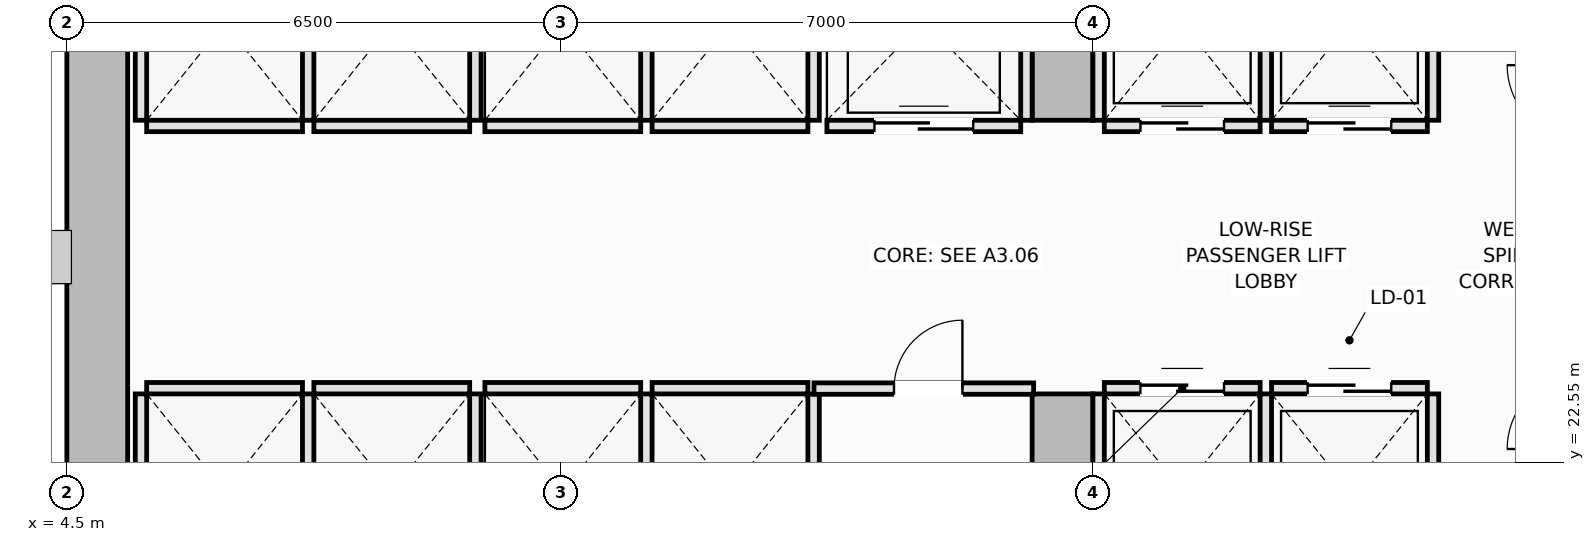
"""IFC4 building model, lengths in metres.
Left out: names, types, materials, properties, quantities, classifications, styles, units other than length and angle.
Written with IfcOpenShell. Run it as: python <this file> out.ifc"""

import sys

from ifc_helpers import new_model, si_unit, direction, frame, frame_2d, origin, place, context, subcontext, project, spatial, rectangle, extrude, element, fill, save


model = new_model("IFC4")
c1 = context("Model", 3, precision=1e-05, world=origin(), true_north=direction((0.0, 1.0)))
c2 = subcontext(c1, "Body", "Model", "MODEL_VIEW")
j1 = project(units=[si_unit("LENGTHUNIT", "METRE"), si_unit("PLANEANGLEUNIT", "RADIAN")], contexts=[c1])
p1 = place(None, origin())
s1 = spatial("IfcSite", under=j1, at=p1, CompositionType="ELEMENT")
p2 = place(p1, origin())
s2 = spatial("IfcBuilding", under=s1, at=p2, CompositionType="ELEMENT")
p3 = place(p2, frame((0.0, 0.0, 85.95)))
s3 = spatial("IfcBuildingStorey", under=s2, at=p3, CompositionType="ELEMENT", Elevation=85.95)
p4 = place(p3, frame((4.9, 14.8, 0.0), z_axis=(0.0, 0.0, 1.0), x_axis=(0.0, 1.0, 0.0)))
e1 = element("IfcWall", 1, at=p4, inside=s3, PredefinedType="SHEAR", context=c2, shape_type="SweptSolid", body=[
    extrude(rectangle(XDim=20.9, YDim=0.8, at=frame_2d((10.45, 0.0))), origin(), (0.0, 0.0, 1.0), 3.55),
])
p5 = place(p3, frame((17.6, 14.8, 0.0), z_axis=(0.0, 0.0, 1.0), x_axis=(0.0, 1.0, 0.0)))
e2 = element("IfcWall", 2, at=p5, inside=s3, PredefinedType="SHEAR", context=c2, shape_type="SweptSolid", body=[
    extrude(rectangle(XDim=8.65, YDim=0.8, at=frame_2d((4.325, 0.0))), origin(), (0.0, 0.0, 1.0), 3.55),
])
p6 = place(p5, frame((4.1, 0.0, 0.0)))
e3 = element("IfcOpeningElement", 3, at=p6, cuts=e2, PredefinedType="OPENING", context=c2, shape_type="SweptSolid", body=[
    extrude(rectangle(XDim=1.1, YDim=2.15, at=frame_2d((0.55, 1.075))), frame((0.0, 0.41, 0.0), z_axis=(0.0, -1.0, 0.0), x_axis=(1.0, 0.0, 0.0)), (0.0, 0.0, 1.0), 0.82),
])
p7 = place(p3, frame((17.6, 27.05, 0.0), z_axis=(0.0, 0.0, 1.0), x_axis=(0.0, 1.0, 0.0)))
e4 = element("IfcWall", 4, at=p7, inside=s3, PredefinedType="SHEAR", context=c2, shape_type="SweptSolid", body=[
    extrude(rectangle(XDim=8.65, YDim=0.8, at=frame_2d((4.325, 0.0))), origin(), (0.0, 0.0, 1.0), 3.55),
])
p8 = place(p7, frame((3.45, 0.0, 0.0)))
e5 = element("IfcOpeningElement", 5, at=p8, cuts=e4, PredefinedType="OPENING", context=c2, shape_type="SweptSolid", body=[
    extrude(rectangle(XDim=1.1, YDim=2.15, at=frame_2d((0.55, 1.075))), frame((0.0, 0.41, 0.0), z_axis=(0.0, -1.0, 0.0), x_axis=(1.0, 0.0, 0.0)), (0.0, 0.0, 1.0), 0.82),
])
p9 = place(p3, frame((18.15, 23.525, 0.0), z_axis=(0.0, 0.0, 1.0), x_axis=(1.0, 0.0, 0.0)))
e6 = element("IfcWall", 6, at=p9, inside=s3, PredefinedType="PARTITIONING", context=c2, shape_type="SweptSolid", body=[
    extrude(rectangle(XDim=2.05, YDim=0.15, at=frame_2d((1.025, 0.0))), origin(), (0.0, 0.0, 1.0), 3.37),
])
p10 = place(p9, frame((0.475, 0.0, 0.0)))
e7 = element("IfcOpeningElement", 7, at=p10, cuts=e6, PredefinedType="OPENING", context=c2, shape_type="SweptSolid", body=[
    extrude(rectangle(XDim=1.1, YDim=2.2, at=frame_2d((0.55, 1.1))), frame((0.0, 0.085, 0.0), z_axis=(0.0, -1.0, 0.0), x_axis=(1.0, 0.0, 0.0)), (0.0, 0.0, 1.0), 0.17),
])
for number, where, z_axis, x_axis in (
    (8, (18.075, 20.9, 0.0), (0.0, 0.0, 1.0), (0.0, 1.0, 0.0)),
    (9, (20.275, 20.9, 0.0), (0.0, 0.0, 1.0), (0.0, 1.0, 0.0)),
):
    element("IfcWall", number, at=place(p3, frame(where, z_axis=z_axis, x_axis=x_axis)), inside=s3, PredefinedType="PARTITIONING", context=c2, shape_type="SweptSolid", body=[
        extrude(rectangle(XDim=2.55, YDim=0.15, at=frame_2d((1.275, 0.0))), origin(), (0.0, 0.0, 1.0), 3.37),
    ])
p11 = place(p3, frame((20.35, 23.525, 0.0), z_axis=(0.0, 0.0, 1.0), x_axis=(1.0, 0.0, 0.0)))
e10 = element("IfcWall", 10, at=p11, inside=s3, PredefinedType="PARTITIONING", context=c2, shape_type="SweptSolid", body=[
    extrude(rectangle(XDim=2.05, YDim=0.15, at=frame_2d((1.025, 0.0))), origin(), (0.0, 0.0, 1.0), 3.37),
])
p12 = place(p11, frame((0.475, 0.0, 0.0)))
e11 = element("IfcOpeningElement", 11, at=p12, cuts=e10, PredefinedType="OPENING", context=c2, shape_type="SweptSolid", body=[
    extrude(rectangle(XDim=1.1, YDim=2.2, at=frame_2d((0.55, 1.1))), frame((0.0, 0.085, 0.0), z_axis=(0.0, -1.0, 0.0), x_axis=(1.0, 0.0, 0.0)), (0.0, 0.0, 1.0), 0.17),
])
p13 = place(p3, frame((22.475, 20.9, 0.0), z_axis=(0.0, 0.0, 1.0), x_axis=(0.0, 1.0, 0.0)))
e12 = element("IfcWall", 12, at=p13, inside=s3, PredefinedType="PARTITIONING", context=c2, shape_type="SweptSolid", body=[
    extrude(rectangle(XDim=2.55, YDim=0.15, at=frame_2d((1.275, 0.0))), origin(), (0.0, 0.0, 1.0), 3.37),
])
p14 = place(p3, frame((18.15, 26.975, 0.0), z_axis=(0.0, 0.0, 1.0), x_axis=(1.0, 0.0, 0.0)))
e13 = element("IfcWall", 13, at=p14, inside=s3, PredefinedType="PARTITIONING", context=c2, shape_type="SweptSolid", body=[
    extrude(rectangle(XDim=2.05, YDim=0.15, at=frame_2d((1.025, 0.0))), origin(), (0.0, 0.0, 1.0), 3.37),
])
p15 = place(p14, frame((0.475, 0.0, 0.0)))
e14 = element("IfcOpeningElement", 14, at=p15, cuts=e13, PredefinedType="OPENING", context=c2, shape_type="SweptSolid", body=[
    extrude(rectangle(XDim=1.1, YDim=2.2, at=frame_2d((0.55, 1.1))), frame((0.0, 0.085, 0.0), z_axis=(0.0, -1.0, 0.0), x_axis=(1.0, 0.0, 0.0)), (0.0, 0.0, 1.0), 0.17),
])
for number, where, z_axis, x_axis in (
    (15, (18.075, 27.05, 0.0), (0.0, 0.0, 1.0), (0.0, 1.0, 0.0)),
    (16, (20.275, 27.05, 0.0), (0.0, 0.0, 1.0), (0.0, 1.0, 0.0)),
):
    element("IfcWall", number, at=place(p3, frame(where, z_axis=z_axis, x_axis=x_axis)), inside=s3, PredefinedType="PARTITIONING", context=c2, shape_type="SweptSolid", body=[
        extrude(rectangle(XDim=2.55, YDim=0.15, at=frame_2d((1.275, 0.0))), origin(), (0.0, 0.0, 1.0), 3.37),
    ])
p16 = place(p3, frame((20.35, 26.975, 0.0), z_axis=(0.0, 0.0, 1.0), x_axis=(1.0, 0.0, 0.0)))
e17 = element("IfcWall", 17, at=p16, inside=s3, PredefinedType="PARTITIONING", context=c2, shape_type="SweptSolid", body=[
    extrude(rectangle(XDim=2.05, YDim=0.15, at=frame_2d((1.025, 0.0))), origin(), (0.0, 0.0, 1.0), 3.37),
])
p17 = place(p16, frame((0.475, 0.0, 0.0)))
e18 = element("IfcOpeningElement", 18, at=p17, cuts=e17, PredefinedType="OPENING", context=c2, shape_type="SweptSolid", body=[
    extrude(rectangle(XDim=1.1, YDim=2.2, at=frame_2d((0.55, 1.1))), frame((0.0, 0.085, 0.0), z_axis=(0.0, -1.0, 0.0), x_axis=(1.0, 0.0, 0.0)), (0.0, 0.0, 1.0), 0.17),
])
p18 = place(p3, frame((22.475, 27.05, 0.0), z_axis=(0.0, 0.0, 1.0), x_axis=(0.0, 1.0, 0.0)))
e19 = element("IfcWall", 19, at=p18, inside=s3, PredefinedType="PARTITIONING", context=c2, shape_type="SweptSolid", body=[
    extrude(rectangle(XDim=2.55, YDim=0.15, at=frame_2d((1.275, 0.0))), origin(), (0.0, 0.0, 1.0), 3.37),
])
p19 = place(p3, frame((5.55, 23.525, 0.0), z_axis=(0.0, 0.0, 1.0), x_axis=(1.0, 0.0, 0.0)))
e20 = element("IfcWall", 20, at=p19, inside=s3, PredefinedType="PARTITIONING", context=c2, shape_type="SweptSolid", body=[
    extrude(rectangle(XDim=2.05, YDim=0.15, at=frame_2d((1.025, 0.0))), origin(), (0.0, 0.0, 1.0), 3.37),
])
for number, where, z_axis, x_axis in (
    (21, (5.475, 20.9, 0.0), (0.0, 0.0, 1.0), (0.0, 1.0, 0.0)),
    (22, (7.675, 20.9, 0.0), (0.0, 0.0, 1.0), (0.0, 1.0, 0.0)),
):
    element("IfcWall", number, at=place(p3, frame(where, z_axis=z_axis, x_axis=x_axis)), inside=s3, PredefinedType="PARTITIONING", context=c2, shape_type="SweptSolid", body=[
        extrude(rectangle(XDim=2.55, YDim=0.15, at=frame_2d((1.275, 0.0))), origin(), (0.0, 0.0, 1.0), 3.37),
    ])
p20 = place(p3, frame((7.75, 23.525, 0.0), z_axis=(0.0, 0.0, 1.0), x_axis=(1.0, 0.0, 0.0)))
e23 = element("IfcWall", 23, at=p20, inside=s3, PredefinedType="PARTITIONING", context=c2, shape_type="SweptSolid", body=[
    extrude(rectangle(XDim=2.05, YDim=0.15, at=frame_2d((1.025, 0.0))), origin(), (0.0, 0.0, 1.0), 3.37),
])
p21 = place(p3, frame((9.875, 20.9, 0.0), z_axis=(0.0, 0.0, 1.0), x_axis=(0.0, 1.0, 0.0)))
e24 = element("IfcWall", 24, at=p21, inside=s3, PredefinedType="PARTITIONING", context=c2, shape_type="SweptSolid", body=[
    extrude(rectangle(XDim=2.55, YDim=0.15, at=frame_2d((1.275, 0.0))), origin(), (0.0, 0.0, 1.0), 3.37),
])
p22 = place(p3, frame((5.55, 26.975, 0.0), z_axis=(0.0, 0.0, 1.0), x_axis=(1.0, 0.0, 0.0)))
e25 = element("IfcWall", 25, at=p22, inside=s3, PredefinedType="PARTITIONING", context=c2, shape_type="SweptSolid", body=[
    extrude(rectangle(XDim=2.05, YDim=0.15, at=frame_2d((1.025, 0.0))), origin(), (0.0, 0.0, 1.0), 3.37),
])
for number, where, z_axis, x_axis in (
    (26, (5.475, 27.05, 0.0), (0.0, 0.0, 1.0), (0.0, 1.0, 0.0)),
    (27, (7.675, 27.05, 0.0), (0.0, 0.0, 1.0), (0.0, 1.0, 0.0)),
):
    element("IfcWall", number, at=place(p3, frame(where, z_axis=z_axis, x_axis=x_axis)), inside=s3, PredefinedType="PARTITIONING", context=c2, shape_type="SweptSolid", body=[
        extrude(rectangle(XDim=2.55, YDim=0.15, at=frame_2d((1.275, 0.0))), origin(), (0.0, 0.0, 1.0), 3.37),
    ])
p23 = place(p3, frame((7.75, 26.975, 0.0), z_axis=(0.0, 0.0, 1.0), x_axis=(1.0, 0.0, 0.0)))
e28 = element("IfcWall", 28, at=p23, inside=s3, PredefinedType="PARTITIONING", context=c2, shape_type="SweptSolid", body=[
    extrude(rectangle(XDim=2.05, YDim=0.15, at=frame_2d((1.025, 0.0))), origin(), (0.0, 0.0, 1.0), 3.37),
])
p24 = place(p3, frame((9.875, 27.05, 0.0), z_axis=(0.0, 0.0, 1.0), x_axis=(0.0, 1.0, 0.0)))
e29 = element("IfcWall", 29, at=p24, inside=s3, PredefinedType="PARTITIONING", context=c2, shape_type="SweptSolid", body=[
    extrude(rectangle(XDim=2.55, YDim=0.15, at=frame_2d((1.275, 0.0))), origin(), (0.0, 0.0, 1.0), 3.37),
])
p25 = place(p3, frame((10.0, 23.525, 0.0), z_axis=(0.0, 0.0, 1.0), x_axis=(1.0, 0.0, 0.0)))
e30 = element("IfcWall", 30, at=p25, inside=s3, PredefinedType="PARTITIONING", context=c2, shape_type="SweptSolid", body=[
    extrude(rectangle(XDim=2.05, YDim=0.15, at=frame_2d((1.025, 0.0))), origin(), (0.0, 0.0, 1.0), 3.37),
])
p26 = place(p3, frame((12.125, 20.9, 0.0), z_axis=(0.0, 0.0, 1.0), x_axis=(0.0, 1.0, 0.0)))
e31 = element("IfcWall", 31, at=p26, inside=s3, PredefinedType="PARTITIONING", context=c2, shape_type="SweptSolid", body=[
    extrude(rectangle(XDim=2.55, YDim=0.15, at=frame_2d((1.275, 0.0))), origin(), (0.0, 0.0, 1.0), 3.37),
])
p27 = place(p3, frame((12.2, 23.525, 0.0), z_axis=(0.0, 0.0, 1.0), x_axis=(1.0, 0.0, 0.0)))
e32 = element("IfcWall", 32, at=p27, inside=s3, PredefinedType="PARTITIONING", context=c2, shape_type="SweptSolid", body=[
    extrude(rectangle(XDim=2.05, YDim=0.15, at=frame_2d((1.025, 0.0))), origin(), (0.0, 0.0, 1.0), 3.37),
])
p28 = place(p3, frame((14.325, 20.9, 0.0), z_axis=(0.0, 0.0, 1.0), x_axis=(0.0, 1.0, 0.0)))
e33 = element("IfcWall", 33, at=p28, inside=s3, PredefinedType="PARTITIONING", context=c2, shape_type="SweptSolid", body=[
    extrude(rectangle(XDim=2.55, YDim=0.15, at=frame_2d((1.275, 0.0))), origin(), (0.0, 0.0, 1.0), 3.37),
])
p29 = place(p3, frame((10.0, 26.975, 0.0), z_axis=(0.0, 0.0, 1.0), x_axis=(1.0, 0.0, 0.0)))
e34 = element("IfcWall", 34, at=p29, inside=s3, PredefinedType="PARTITIONING", context=c2, shape_type="SweptSolid", body=[
    extrude(rectangle(XDim=2.05, YDim=0.15, at=frame_2d((1.025, 0.0))), origin(), (0.0, 0.0, 1.0), 3.37),
])
p30 = place(p3, frame((12.125, 27.05, 0.0), z_axis=(0.0, 0.0, 1.0), x_axis=(0.0, 1.0, 0.0)))
e35 = element("IfcWall", 35, at=p30, inside=s3, PredefinedType="PARTITIONING", context=c2, shape_type="SweptSolid", body=[
    extrude(rectangle(XDim=2.55, YDim=0.15, at=frame_2d((1.275, 0.0))), origin(), (0.0, 0.0, 1.0), 3.37),
])
p31 = place(p3, frame((12.2, 26.975, 0.0), z_axis=(0.0, 0.0, 1.0), x_axis=(1.0, 0.0, 0.0)))
e36 = element("IfcWall", 36, at=p31, inside=s3, PredefinedType="PARTITIONING", context=c2, shape_type="SweptSolid", body=[
    extrude(rectangle(XDim=2.05, YDim=0.15, at=frame_2d((1.025, 0.0))), origin(), (0.0, 0.0, 1.0), 3.37),
])
p32 = place(p3, frame((14.325, 27.05, 0.0), z_axis=(0.0, 0.0, 1.0), x_axis=(0.0, 1.0, 0.0)))
e37 = element("IfcWall", 37, at=p32, inside=s3, PredefinedType="PARTITIONING", context=c2, shape_type="SweptSolid", body=[
    extrude(rectangle(XDim=2.55, YDim=0.15, at=frame_2d((1.275, 0.0))), origin(), (0.0, 0.0, 1.0), 3.37),
])
p33 = place(p3, frame((14.5, 26.975, 0.0), z_axis=(0.0, 0.0, 1.0), x_axis=(1.0, 0.0, 0.0)))
e38 = element("IfcWall", 38, at=p33, inside=s3, PredefinedType="PARTITIONING", context=c2, shape_type="SweptSolid", body=[
    extrude(rectangle(XDim=2.55, YDim=0.15, at=frame_2d((1.275, 0.0))), origin(), (0.0, 0.0, 1.0), 3.37),
])
p34 = place(p33, frame((0.625, 0.0, 0.0)))
e39 = element("IfcOpeningElement", 39, at=p34, cuts=e38, PredefinedType="OPENING", context=c2, shape_type="SweptSolid", body=[
    extrude(rectangle(XDim=1.3, YDim=2.2, at=frame_2d((0.65, 1.1))), frame((0.0, 0.085, 0.0), z_axis=(0.0, -1.0, 0.0), x_axis=(1.0, 0.0, 0.0)), (0.0, 0.0, 1.0), 0.17),
])
p35 = place(p3, frame((17.125, 27.05, 0.0), z_axis=(0.0, 0.0, 1.0), x_axis=(0.0, 1.0, 0.0)))
e40 = element("IfcWall", 40, at=p35, inside=s3, PredefinedType="PARTITIONING", context=c2, shape_type="SweptSolid", body=[
    extrude(rectangle(XDim=2.6, YDim=0.15, at=frame_2d((1.3, 0.0))), origin(), (0.0, 0.0, 1.0), 3.37),
])
p36 = place(p3, frame((14.33, 23.52, 0.0), z_axis=(0.0, 0.0, 1.0), x_axis=(1.0, 0.0, 0.0)))
e41 = element("IfcWall", 41, at=p36, inside=s3, PredefinedType="PARTITIONING", context=c2, shape_type="SweptSolid", body=[
    extrude(rectangle(XDim=2.89, YDim=0.15, at=frame_2d((1.445, 0.0))), origin(), (0.0, 0.0, 1.0), 3.37),
])
p37 = place(p36, frame((1.053, 0.0, 0.0)))
e42 = element("IfcOpeningElement", 42, at=p37, cuts=e41, PredefinedType="OPENING", context=c2, shape_type="SweptSolid", body=[
    extrude(rectangle(XDim=0.9, YDim=2.1, at=frame_2d((0.45, 1.05))), frame((0.0, 0.085, 0.0), z_axis=(0.0, -1.0, 0.0), x_axis=(1.0, 0.0, 0.0)), (0.0, 0.0, 1.0), 0.17),
])
p38 = place(p10, origin())
e43 = element("IfcDoor", 43, at=p38, inside=s3, OperationType="DOUBLE_DOOR_SLIDING", PredefinedType="DOOR", context=c2, shape_type="SweptSolid", body=[
    extrude(rectangle(XDim=1.1, YDim=2.2, at=frame_2d((0.55, 1.1))), frame((0.0, 0.025, 0.0), z_axis=(0.0, -1.0, 0.0), x_axis=(1.0, 0.0, 0.0)), (0.0, 0.0, 1.0), 0.05),
])
fill(e7, e43)
p39 = place(p12, origin())
e44 = element("IfcDoor", 44, at=p39, inside=s3, OperationType="DOUBLE_DOOR_SLIDING", PredefinedType="DOOR", context=c2, shape_type="SweptSolid", body=[
    extrude(rectangle(XDim=1.1, YDim=2.2, at=frame_2d((0.55, 1.1))), frame((0.0, 0.025, 0.0), z_axis=(0.0, -1.0, 0.0), x_axis=(1.0, 0.0, 0.0)), (0.0, 0.0, 1.0), 0.05),
])
fill(e11, e44)
p40 = place(p15, origin())
e45 = element("IfcDoor", 45, at=p40, inside=s3, OperationType="DOUBLE_DOOR_SLIDING", PredefinedType="DOOR", context=c2, shape_type="SweptSolid", body=[
    extrude(rectangle(XDim=1.1, YDim=2.2, at=frame_2d((0.55, 1.1))), frame((0.0, 0.025, 0.0), z_axis=(0.0, -1.0, 0.0), x_axis=(1.0, 0.0, 0.0)), (0.0, 0.0, 1.0), 0.05),
])
fill(e14, e45)
p41 = place(p17, origin())
e46 = element("IfcDoor", 46, at=p41, inside=s3, OperationType="DOUBLE_DOOR_SLIDING", PredefinedType="DOOR", context=c2, shape_type="SweptSolid", body=[
    extrude(rectangle(XDim=1.1, YDim=2.2, at=frame_2d((0.55, 1.1))), frame((0.0, 0.025, 0.0), z_axis=(0.0, -1.0, 0.0), x_axis=(1.0, 0.0, 0.0)), (0.0, 0.0, 1.0), 0.05),
])
fill(e18, e46)
p42 = place(p34, origin())
e47 = element("IfcDoor", 47, at=p42, inside=s3, OperationType="DOUBLE_DOOR_SLIDING", PredefinedType="DOOR", context=c2, shape_type="SweptSolid", body=[
    extrude(rectangle(XDim=1.3, YDim=2.2, at=frame_2d((0.65, 1.1))), frame((0.0, 0.025, 0.0), z_axis=(0.0, -1.0, 0.0), x_axis=(1.0, 0.0, 0.0)), (0.0, 0.0, 1.0), 0.05),
])
fill(e39, e47)
p43 = place(p37, origin())
e48 = element("IfcDoor", 48, at=p43, inside=s3, OperationType="SINGLE_SWING_RIGHT", PredefinedType="DOOR", context=c2, shape_type="SweptSolid", body=[
    extrude(rectangle(XDim=0.9, YDim=2.1, at=frame_2d((0.45, 1.05))), frame((0.0, 0.025, 0.0), z_axis=(0.0, -1.0, 0.0), x_axis=(1.0, 0.0, 0.0)), (0.0, 0.0, 1.0), 0.05),
])
fill(e42, e48)
save(model, sys.argv[1])
